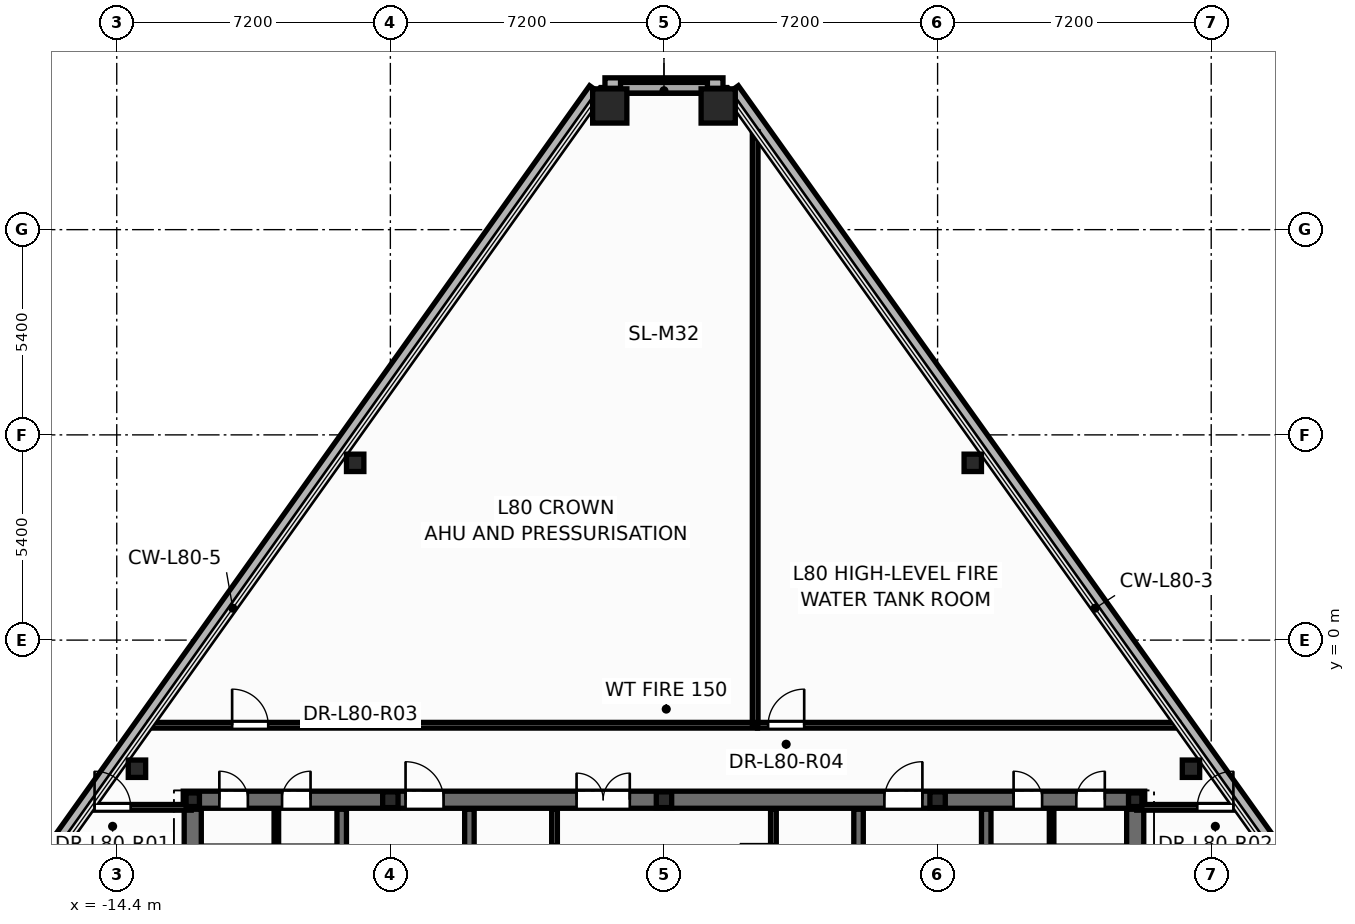
"""IFC4 building model, lengths in metres.
Left out: names, types, materials, properties, quantities, classifications, styles, units other than length and angle.
Written with IfcOpenShell. Run it as: python <this file> out.ifc"""

import sys

from ifc_helpers import new_model, si_unit, direction, frame, frame_2d, origin, origin_2d, place, context, subcontext, project, spatial, rectangle, hollow_rectangle, hollow_circle, i_section, extrude, element, fill, save


model = new_model("IFC4")
c1 = context("Model", 3, precision=1e-05, world=origin(), true_north=direction((0.0, 1.0)))
c2 = subcontext(c1, "Body", "Model", "MODEL_VIEW")
j1 = project(units=[si_unit("LENGTHUNIT", "METRE"), si_unit("PLANEANGLEUNIT", "RADIAN")], contexts=[c1])
p1 = place(None, origin())
s1 = spatial("IfcSite", under=j1, at=p1, CompositionType="ELEMENT")
p2 = place(p1, origin())
s2 = spatial("IfcBuilding", under=s1, at=p2, CompositionType="ELEMENT")
p3 = place(p2, frame((0.0, 0.0, 306.0)))
s3 = spatial("IfcBuildingStorey", under=s2, at=p3, CompositionType="ELEMENT", Elevation=306.0)
for number, where, z_axis, x_axis in (
    (1, (1.427, 14.055, 0.0), (0.0, 0.0, 1.0), (1.0, 0.0, 0.0)),
    (2, (-1.427, 14.055, 0.0), (0.0, 0.0, 1.0), (1.0, 0.0, 0.0)),
):
    element("IfcColumn", number, at=place(p3, frame(where, z_axis=z_axis, x_axis=x_axis)), inside=s3, PredefinedType="COLUMN", context=c2, shape_type="SweptSolid", body=[
        extrude(hollow_rectangle(XDim=0.9, YDim=0.9, WallThickness=0.04, at=origin_2d()), origin(), (0.0, 0.0, 1.0), 4.2),
    ])
for number, where, z_axis, x_axis in (
    (3, (13.868, -3.385, 0.0), (0.0, 0.0, 1.0), (1.0, 0.0, 0.0)),
    (4, (8.126, 4.664, 0.0), (0.0, 0.0, 1.0), (1.0, 0.0, 0.0)),
    (5, (-8.126, 4.664, 0.0), (0.0, 0.0, 1.0), (1.0, 0.0, 0.0)),
    (6, (-13.868, -3.385, 0.0), (0.0, 0.0, 1.0), (1.0, 0.0, 0.0)),
):
    element("IfcColumn", number, at=place(p3, frame(where, z_axis=z_axis, x_axis=x_axis)), inside=s3, PredefinedType="COLUMN", context=c2, shape_type="SweptSolid", body=[
        extrude(hollow_circle(Radius=0.229, WallThickness=0.016, at=origin_2d()), origin(), (0.0, 0.0, 1.0), 4.2),
    ])
for number, where, z_axis, x_axis in (
    (7, (12.4, -4.2, 0.0), (0.0, 0.0, 1.0), (1.0, 0.0, 0.0)),
    (8, (-12.4, -4.2, 0.0), (0.0, 0.0, 1.0), (1.0, 0.0, 0.0)),
):
    element("IfcColumn", number, at=place(p3, frame(where, z_axis=z_axis, x_axis=x_axis)), inside=s3, PredefinedType="COLUMN", context=c2, shape_type="SweptSolid", body=[
        extrude(i_section(OverallWidth=0.352, OverallDepth=0.359, WebThickness=0.018, FlangeThickness=0.026, at=origin_2d()), origin(), (0.0, 0.0, 1.0), 4.2),
    ])
for number, where, z_axis, x_axis in (
    (9, (-7.2, -4.2, 0.0), (0.0, 0.0, 1.0), (1.0, 0.0, 0.0)),
    (10, (0.0, -4.2, 0.0), (0.0, 0.0, 1.0), (1.0, 0.0, 0.0)),
    (11, (7.2, -4.2, 0.0), (0.0, 0.0, 1.0), (1.0, 0.0, 0.0)),
):
    element("IfcColumn", number, at=place(p3, frame(where, z_axis=z_axis, x_axis=x_axis)), inside=s3, PredefinedType="PILASTER", context=c2, shape_type="SweptSolid", body=[
        extrude(i_section(OverallWidth=0.405, OverallDepth=0.414, WebThickness=0.022, FlangeThickness=0.032, at=origin_2d()), origin(), (0.0, 0.0, 1.0), 4.2),
    ])
p4 = place(p3, frame((21.142, -12.617, -0.2), z_axis=(0.0, 0.0, 1.0), x_axis=(-0.580755919834, 0.814077736815, 0.0)))
e12 = element("IfcWall", 12, at=p4, inside=s3, PredefinedType="PARAPET", context=c2, shape_type="SweptSolid", body=[
    extrude(rectangle(XDim=33.288, YDim=0.36, at=frame_2d((16.644, 0.0))), origin(), (0.0, 0.0, 1.0), 0.38),
])
p5 = place(p3, frame((1.553, 14.615, -0.2), z_axis=(0.0, 0.0, 1.0), x_axis=(-1.0, 0.0, 0.0)))
e13 = element("IfcWall", 13, at=p5, inside=s3, PredefinedType="PARAPET", context=c2, shape_type="SweptSolid", body=[
    extrude(rectangle(XDim=3.105, YDim=0.36, at=frame_2d((1.553, 0.0))), origin(), (0.0, 0.0, 1.0), 0.38),
])
p6 = place(p3, frame((-1.81, 14.482, -0.2), z_axis=(0.0, 0.0, 1.0), x_axis=(-0.580755919834, -0.814077736815, 0.0)))
e14 = element("IfcWall", 14, at=p6, inside=s3, PredefinedType="PARAPET", context=c2, shape_type="SweptSolid", body=[
    extrude(rectangle(XDim=33.288, YDim=0.36, at=frame_2d((16.644, 0.0))), origin(), (0.0, 0.0, 1.0), 0.38),
])
p7 = place(p3, frame((-2.88, -7.1, 0.0), z_axis=(0.0, 0.0, 1.0), x_axis=(0.0, 1.0, 0.0)))
e15 = element("IfcWall", 15, at=p7, inside=s3, PredefinedType="PARTITIONING", context=c2, shape_type="SweptSolid", body=[
    extrude(rectangle(XDim=2.65, YDim=0.15, at=frame_2d((1.325, 0.0))), origin(), (0.0, 0.0, 1.0), 2.977),
])
p8 = place(p7, frame((0.85, 0.0, 0.0)))
e16 = element("IfcOpeningElement", 16, at=p8, cuts=e15, PredefinedType="OPENING", context=c2, shape_type="SweptSolid", body=[
    extrude(rectangle(XDim=0.886, YDim=2.104, at=frame_2d((0.44, 1.052))), frame((0.0, 0.085, 0.0), z_axis=(0.0, -1.0, 0.0), x_axis=(1.0, 0.0, 0.0)), (0.0, 0.0, 1.0), 0.17),
])
p9 = place(p3, frame((2.88, -7.1, 0.0), z_axis=(0.0, 0.0, 1.0), x_axis=(0.0, 1.0, 0.0)))
e17 = element("IfcWall", 17, at=p9, inside=s3, PredefinedType="PARTITIONING", context=c2, shape_type="SweptSolid", body=[
    extrude(rectangle(XDim=2.65, YDim=0.15, at=frame_2d((1.325, 0.0))), origin(), (0.0, 0.0, 1.0), 2.977),
])
p10 = place(p9, frame((0.85, 0.0, 0.0)))
e18 = element("IfcOpeningElement", 18, at=p10, cuts=e17, PredefinedType="OPENING", context=c2, shape_type="SweptSolid", body=[
    extrude(rectangle(XDim=0.886, YDim=2.104, at=frame_2d((0.44, 1.052))), frame((0.0, 0.085, 0.0), z_axis=(0.0, -1.0, 0.0), x_axis=(1.0, 0.0, 0.0)), (0.0, 0.0, 1.0), 0.17),
])
for number, where, z_axis, x_axis in (
    (19, (-10.2, -5.52, 0.0), (0.0, 0.0, 1.0), (0.0, 1.0, 0.0)),
    (20, (10.2, -5.52, 0.0), (0.0, 0.0, 1.0), (0.0, 1.0, 0.0)),
):
    element("IfcWall", number, at=place(p3, frame(where, z_axis=z_axis, x_axis=x_axis)), inside=s3, PredefinedType="PARTITIONING", context=c2, shape_type="SweptSolid", body=[
        extrude(rectangle(XDim=1.12, YDim=0.12, at=frame_2d((0.56, 0.0))), origin(), (0.0, 0.0, 1.0), 3.9),
    ])
p11 = place(p3, frame((-12.65, -4.2, 0.0), z_axis=(0.0, 0.0, 1.0), x_axis=(1.0, 0.0, 0.0)))
e21 = element("IfcWall", 21, at=p11, inside=s3, PredefinedType="SHEAR", context=c2, shape_type="SweptSolid", body=[
    extrude(rectangle(XDim=25.3, YDim=0.45, at=frame_2d((12.65, 0.0))), origin(), (0.0, 0.0, 1.0), 3.9),
])
p12 = place(p11, frame((0.95, 0.0, 0.0)))
e22 = element("IfcOpeningElement", 22, at=p12, cuts=e21, PredefinedType="OPENING", context=c2, shape_type="SweptSolid", body=[
    extrude(rectangle(XDim=0.756, YDim=2.054, at=frame_2d((0.375, 1.027))), frame((0.0, 0.235, 0.0), z_axis=(0.0, -1.0, 0.0), x_axis=(1.0, 0.0, 0.0)), (0.0, 0.0, 1.0), 0.47),
])
p13 = place(p11, frame((2.6, 0.0, 0.0)))
e23 = element("IfcOpeningElement", 23, at=p13, cuts=e21, PredefinedType="OPENING", context=c2, shape_type="SweptSolid", body=[
    extrude(rectangle(XDim=0.756, YDim=2.054, at=frame_2d((0.375, 1.027))), frame((0.0, 0.235, 0.0), z_axis=(0.0, -1.0, 0.0), x_axis=(1.0, 0.0, 0.0)), (0.0, 0.0, 1.0), 0.47),
])
p14 = place(p11, frame((21.85, 0.0, 0.0)))
e24 = element("IfcOpeningElement", 24, at=p14, cuts=e21, PredefinedType="OPENING", context=c2, shape_type="SweptSolid", body=[
    extrude(rectangle(XDim=0.756, YDim=2.054, at=frame_2d((0.375, 1.027))), frame((0.0, 0.235, 0.0), z_axis=(0.0, -1.0, 0.0), x_axis=(1.0, 0.0, 0.0)), (0.0, 0.0, 1.0), 0.47),
])
p15 = place(p11, frame((23.5, 0.0, 0.0)))
e25 = element("IfcOpeningElement", 25, at=p15, cuts=e21, PredefinedType="OPENING", context=c2, shape_type="SweptSolid", body=[
    extrude(rectangle(XDim=0.756, YDim=2.054, at=frame_2d((0.375, 1.027))), frame((0.0, 0.235, 0.0), z_axis=(0.0, -1.0, 0.0), x_axis=(1.0, 0.0, 0.0)), (0.0, 0.0, 1.0), 0.47),
])
p16 = place(p11, frame((5.85, 0.0, 0.0)))
e26 = element("IfcOpeningElement", 26, at=p16, cuts=e21, PredefinedType="OPENING", context=c2, shape_type="SweptSolid", body=[
    extrude(rectangle(XDim=1.006, YDim=2.104, at=frame_2d((0.5, 1.052))), frame((0.0, 0.235, 0.0), z_axis=(0.0, -1.0, 0.0), x_axis=(1.0, 0.0, 0.0)), (0.0, 0.0, 1.0), 0.47),
])
p17 = place(p11, frame((10.35, 0.0, 0.0)))
e27 = element("IfcOpeningElement", 27, at=p17, cuts=e21, PredefinedType="OPENING", context=c2, shape_type="SweptSolid", body=[
    extrude(rectangle(XDim=1.406, YDim=2.154, at=frame_2d((0.7, 1.077))), frame((0.0, 0.235, 0.0), z_axis=(0.0, -1.0, 0.0), x_axis=(1.0, 0.0, 0.0)), (0.0, 0.0, 1.0), 0.47),
])
p18 = place(p11, frame((18.45, 0.0, 0.0)))
e28 = element("IfcOpeningElement", 28, at=p18, cuts=e21, PredefinedType="OPENING", context=c2, shape_type="SweptSolid", body=[
    extrude(rectangle(XDim=1.006, YDim=2.104, at=frame_2d((0.5, 1.052))), frame((0.0, 0.235, 0.0), z_axis=(0.0, -1.0, 0.0), x_axis=(1.0, 0.0, 0.0)), (0.0, 0.0, 1.0), 0.47),
])
p19 = place(p3, frame((-8.48, -13.85, 0.0), z_axis=(0.0, 0.0, 1.0), x_axis=(0.0, 1.0, 0.0)))
e29 = element("IfcWall", 29, at=p19, inside=s3, PredefinedType="SHEAR", context=c2, shape_type="SweptSolid", body=[
    extrude(rectangle(XDim=9.4, YDim=0.25, at=frame_2d((4.7, 0.0))), origin(), (0.0, 0.0, 1.0), 3.9),
])
p20 = place(p19, frame((6.95, 0.0, 0.0)))
e30 = element("IfcOpeningElement", 30, at=p20, cuts=e29, PredefinedType="OPENING", context=c2, shape_type="SweptSolid", body=[
    extrude(rectangle(XDim=1.006, YDim=2.104, at=frame_2d((0.5, 1.052))), frame((0.0, 0.135, 0.0), z_axis=(0.0, -1.0, 0.0), x_axis=(1.0, 0.0, 0.0)), (0.0, 0.0, 1.0), 0.27),
])
p21 = place(p3, frame((8.48, -13.85, 0.0), z_axis=(0.0, 0.0, 1.0), x_axis=(0.0, 1.0, 0.0)))
e31 = element("IfcWall", 31, at=p21, inside=s3, PredefinedType="SHEAR", context=c2, shape_type="SweptSolid", body=[
    extrude(rectangle(XDim=9.4, YDim=0.25, at=frame_2d((4.7, 0.0))), origin(), (0.0, 0.0, 1.0), 3.9),
])
p22 = place(p21, frame((6.95, 0.0, 0.0)))
e32 = element("IfcOpeningElement", 32, at=p22, cuts=e31, PredefinedType="OPENING", context=c2, shape_type="SweptSolid", body=[
    extrude(rectangle(XDim=1.006, YDim=2.104, at=frame_2d((0.5, 1.052))), frame((0.0, 0.135, 0.0), z_axis=(0.0, -1.0, 0.0), x_axis=(1.0, 0.0, 0.0)), (0.0, 0.0, 1.0), 0.27),
])
for number, where, z_axis, x_axis in (
    (33, (-5.12, -13.85, 0.0), (0.0, 0.0, 1.0), (0.0, 1.0, 0.0)),
    (34, (5.12, -13.85, 0.0), (0.0, 0.0, 1.0), (0.0, 1.0, 0.0)),
):
    element("IfcWall", number, at=place(p3, frame(where, z_axis=z_axis, x_axis=x_axis)), inside=s3, PredefinedType="SHEAR", context=c2, shape_type="SweptSolid", body=[
        extrude(rectangle(XDim=9.4, YDim=0.25, at=frame_2d((4.7, 0.0))), origin(), (0.0, 0.0, 1.0), 3.9),
    ])
for number, where, z_axis, x_axis in (
    (35, (-12.4, -13.85, 0.0), (0.0, 0.0, 1.0), (0.0, 1.0, 0.0)),
    (36, (12.4, -13.85, 0.0), (0.0, 0.0, 1.0), (0.0, 1.0, 0.0)),
):
    element("IfcWall", number, at=place(p3, frame(where, z_axis=z_axis, x_axis=x_axis)), inside=s3, PredefinedType="SHEAR", context=c2, shape_type="SweptSolid", body=[
        extrude(rectangle(XDim=9.4, YDim=0.45, at=frame_2d((4.7, 0.0))), origin(), (0.0, 0.0, 1.0), 3.9),
    ])
p23 = place(p3, frame((-13.543, -2.24, 0.0), z_axis=(0.0, 0.0, 1.0), x_axis=(1.0, 0.0, 0.0)))
e37 = element("IfcWall", 37, at=p23, inside=s3, PredefinedType="PARTITIONING", context=c2, shape_type="SweptSolid", body=[
    extrude(rectangle(XDim=16.003, YDim=0.15, at=frame_2d((8.001, 0.0))), origin(), (0.0, 0.0, 1.0), 2.625),
])
p24 = place(p23, frame((2.179, 0.0, 0.0)))
e38 = element("IfcOpeningElement", 38, at=p24, cuts=e37, PredefinedType="OPENING", context=c2, shape_type="SweptSolid", body=[
    extrude(rectangle(XDim=0.956, YDim=2.104, at=frame_2d((0.475, 1.052))), frame((0.0, 0.085, 0.0), z_axis=(0.0, -1.0, 0.0), x_axis=(1.0, 0.0, 0.0)), (0.0, 0.0, 1.0), 0.17),
])
p25 = place(p3, frame((2.4, -2.24, 0.0), z_axis=(0.0, 0.0, 1.0), x_axis=(0.0, 1.0, 0.0)))
e39 = element("IfcWall", 39, at=p25, inside=s3, PredefinedType="PARTITIONING", context=c2, shape_type="SweptSolid", body=[
    extrude(rectangle(XDim=15.619, YDim=0.15, at=frame_2d((7.81, 0.0))), origin(), (0.0, 0.0, 1.0), 2.625),
])
p26 = place(p3, frame((2.462, -2.24, 0.0), z_axis=(0.0, 0.0, 1.0), x_axis=(1.0, 0.0, 0.0)))
e40 = element("IfcWall", 40, at=p26, inside=s3, PredefinedType="PARTITIONING", context=c2, shape_type="SweptSolid", body=[
    extrude(rectangle(XDim=11.081, YDim=0.15, at=frame_2d((5.541, 0.0))), origin(), (0.0, 0.0, 1.0), 2.625),
])
p27 = place(p26, frame((0.278, 0.0, 0.0)))
e41 = element("IfcOpeningElement", 41, at=p27, cuts=e40, PredefinedType="OPENING", context=c2, shape_type="SweptSolid", body=[
    extrude(rectangle(XDim=0.956, YDim=2.104, at=frame_2d((0.475, 1.052))), frame((0.0, 0.085, 0.0), z_axis=(0.0, -1.0, 0.0), x_axis=(1.0, 0.0, 0.0)), (0.0, 0.0, 1.0), 0.17),
])
p28 = place(p3, frame((-15.083, -4.4, 0.0), z_axis=(0.0, 0.0, 1.0), x_axis=(1.0, 0.0, 0.0)))
e42 = element("IfcWall", 42, at=p28, inside=s3, PredefinedType="PARTITIONING", context=c2, shape_type="SweptSolid", body=[
    extrude(rectangle(XDim=2.644, YDim=0.15, at=frame_2d((1.322, 0.0))), origin(), (0.0, 0.0, 1.0), 2.625),
])
p29 = place(p28, frame((0.1, 0.0, 0.0)))
e43 = element("IfcOpeningElement", 43, at=p29, cuts=e42, PredefinedType="OPENING", context=c2, shape_type="SweptSolid", body=[
    extrude(rectangle(XDim=0.956, YDim=2.104, at=frame_2d((0.475, 1.052))), frame((0.0, 0.085, 0.0), z_axis=(0.0, -1.0, 0.0), x_axis=(1.0, 0.0, 0.0)), (0.0, 0.0, 1.0), 0.17),
])
p30 = place(p3, frame((12.44, -4.4, 0.0), z_axis=(0.0, 0.0, 1.0), x_axis=(1.0, 0.0, 0.0)))
e44 = element("IfcWall", 44, at=p30, inside=s3, PredefinedType="PARTITIONING", context=c2, shape_type="SweptSolid", body=[
    extrude(rectangle(XDim=2.644, YDim=0.15, at=frame_2d((1.322, 0.0))), origin(), (0.0, 0.0, 1.0), 2.625),
])
p31 = place(p30, frame((1.594, 0.0, 0.0)))
e45 = element("IfcOpeningElement", 45, at=p31, cuts=e44, PredefinedType="OPENING", context=c2, shape_type="SweptSolid", body=[
    extrude(rectangle(XDim=0.956, YDim=2.104, at=frame_2d((0.475, 1.052))), frame((0.0, 0.085, 0.0), z_axis=(0.0, -1.0, 0.0), x_axis=(1.0, 0.0, 0.0)), (0.0, 0.0, 1.0), 0.17),
])
p32 = place(p8, origin())
e46 = element("IfcDoor", 46, at=p32, inside=s3, OperationType="SINGLE_SWING_LEFT", PredefinedType="DOOR", context=c2, shape_type="SweptSolid", body=[
    extrude(rectangle(XDim=0.88, YDim=2.1, at=frame_2d((0.44, 1.05))), frame((0.0, 0.025, 0.0), z_axis=(0.0, -1.0, 0.0), x_axis=(1.0, 0.0, 0.0)), (0.0, 0.0, 1.0), 0.05),
])
fill(e16, e46)
p33 = place(p10, origin())
e47 = element("IfcDoor", 47, at=p33, inside=s3, OperationType="SINGLE_SWING_RIGHT", PredefinedType="DOOR", context=c2, shape_type="SweptSolid", body=[
    extrude(rectangle(XDim=0.88, YDim=2.1, at=frame_2d((0.44, 1.05))), frame((0.0, 0.025, 0.0), z_axis=(0.0, -1.0, 0.0), x_axis=(1.0, 0.0, 0.0)), (0.0, 0.0, 1.0), 0.05),
])
fill(e18, e47)
p34 = place(p12, origin())
e48 = element("IfcDoor", 48, at=p34, inside=s3, OperationType="SINGLE_SWING_LEFT", PredefinedType="DOOR", context=c2, shape_type="SweptSolid", body=[
    extrude(rectangle(XDim=0.75, YDim=2.05, at=frame_2d((0.375, 1.025))), frame((0.0, 0.025, 0.0), z_axis=(0.0, -1.0, 0.0), x_axis=(1.0, 0.0, 0.0)), (0.0, 0.0, 1.0), 0.05),
])
fill(e22, e48)
p35 = place(p13, origin())
e49 = element("IfcDoor", 49, at=p35, inside=s3, OperationType="SINGLE_SWING_RIGHT", PredefinedType="DOOR", context=c2, shape_type="SweptSolid", body=[
    extrude(rectangle(XDim=0.75, YDim=2.05, at=frame_2d((0.375, 1.025))), frame((0.0, 0.025, 0.0), z_axis=(0.0, -1.0, 0.0), x_axis=(1.0, 0.0, 0.0)), (0.0, 0.0, 1.0), 0.05),
])
fill(e23, e49)
p36 = place(p14, origin())
e50 = element("IfcDoor", 50, at=p36, inside=s3, OperationType="SINGLE_SWING_LEFT", PredefinedType="DOOR", context=c2, shape_type="SweptSolid", body=[
    extrude(rectangle(XDim=0.75, YDim=2.05, at=frame_2d((0.375, 1.025))), frame((0.0, 0.025, 0.0), z_axis=(0.0, -1.0, 0.0), x_axis=(1.0, 0.0, 0.0)), (0.0, 0.0, 1.0), 0.05),
])
fill(e24, e50)
p37 = place(p15, origin())
e51 = element("IfcDoor", 51, at=p37, inside=s3, OperationType="SINGLE_SWING_RIGHT", PredefinedType="DOOR", context=c2, shape_type="SweptSolid", body=[
    extrude(rectangle(XDim=0.75, YDim=2.05, at=frame_2d((0.375, 1.025))), frame((0.0, 0.025, 0.0), z_axis=(0.0, -1.0, 0.0), x_axis=(1.0, 0.0, 0.0)), (0.0, 0.0, 1.0), 0.05),
])
fill(e25, e51)
p38 = place(p16, origin())
e52 = element("IfcDoor", 52, at=p38, inside=s3, OperationType="SINGLE_SWING_LEFT", PredefinedType="DOOR", context=c2, shape_type="SweptSolid", body=[
    extrude(rectangle(XDim=1.0, YDim=2.1, at=frame_2d((0.5, 1.05))), frame((0.0, 0.025, 0.0), z_axis=(0.0, -1.0, 0.0), x_axis=(1.0, 0.0, 0.0)), (0.0, 0.0, 1.0), 0.05),
])
fill(e26, e52)
p39 = place(p17, origin())
e53 = element("IfcDoor", 53, at=p39, inside=s3, OperationType="DOUBLE_DOOR_SINGLE_SWING", PredefinedType="DOOR", context=c2, shape_type="SweptSolid", body=[
    extrude(rectangle(XDim=1.4, YDim=2.15, at=frame_2d((0.7, 1.075))), frame((0.0, 0.025, 0.0), z_axis=(0.0, -1.0, 0.0), x_axis=(1.0, 0.0, 0.0)), (0.0, 0.0, 1.0), 0.05),
])
fill(e27, e53)
p40 = place(p18, origin())
e54 = element("IfcDoor", 54, at=p40, inside=s3, OperationType="SINGLE_SWING_RIGHT", PredefinedType="DOOR", context=c2, shape_type="SweptSolid", body=[
    extrude(rectangle(XDim=1.0, YDim=2.1, at=frame_2d((0.5, 1.05))), frame((0.0, 0.025, 0.0), z_axis=(0.0, -1.0, 0.0), x_axis=(1.0, 0.0, 0.0)), (0.0, 0.0, 1.0), 0.05),
])
fill(e28, e54)
p41 = place(p29, origin())
e55 = element("IfcDoor", 55, at=p41, inside=s3, OperationType="SINGLE_SWING_LEFT", PredefinedType="DOOR", context=c2, shape_type="SweptSolid", body=[
    extrude(rectangle(XDim=0.95, YDim=2.1, at=frame_2d((0.475, 1.05))), frame((0.0, 0.025, 0.0), z_axis=(0.0, -1.0, 0.0), x_axis=(1.0, 0.0, 0.0)), (0.0, 0.0, 1.0), 0.05),
])
fill(e43, e55)
p42 = place(p31, origin())
e56 = element("IfcDoor", 56, at=p42, inside=s3, OperationType="SINGLE_SWING_RIGHT", PredefinedType="DOOR", context=c2, shape_type="SweptSolid", body=[
    extrude(rectangle(XDim=0.95, YDim=2.1, at=frame_2d((0.475, 1.05))), frame((0.0, 0.025, 0.0), z_axis=(0.0, -1.0, 0.0), x_axis=(1.0, 0.0, 0.0)), (0.0, 0.0, 1.0), 0.05),
])
fill(e45, e56)
p43 = place(p24, origin())
e57 = element("IfcDoor", 57, at=p43, inside=s3, OperationType="SINGLE_SWING_LEFT", PredefinedType="DOOR", context=c2, shape_type="SweptSolid", body=[
    extrude(rectangle(XDim=0.95, YDim=2.1, at=frame_2d((0.475, 1.05))), frame((0.0, 0.025, 0.0), z_axis=(0.0, -1.0, 0.0), x_axis=(1.0, 0.0, 0.0)), (0.0, 0.0, 1.0), 0.05),
])
fill(e38, e57)
p44 = place(p27, origin())
e58 = element("IfcDoor", 58, at=p44, inside=s3, OperationType="SINGLE_SWING_RIGHT", PredefinedType="DOOR", context=c2, shape_type="SweptSolid", body=[
    extrude(rectangle(XDim=0.95, YDim=2.1, at=frame_2d((0.475, 1.05))), frame((0.0, 0.025, 0.0), z_axis=(0.0, -1.0, 0.0), x_axis=(1.0, 0.0, 0.0)), (0.0, 0.0, 1.0), 0.05),
])
fill(e41, e58)
save(model, sys.argv[1])
